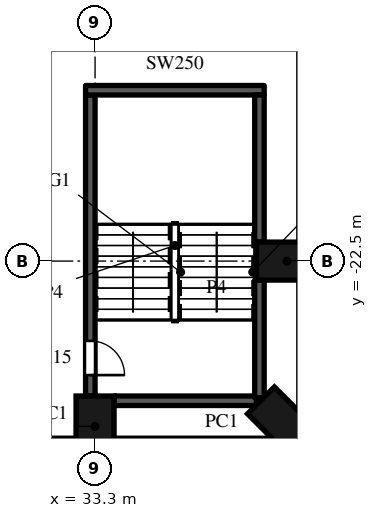
"""IFC4 building model, lengths in metres.
Left out: names, types, materials, properties, quantities, classifications, styles, units other than length and angle.
Written with IfcOpenShell. Run it as: python <this file> out.ifc"""

import sys

from ifc_helpers import new_model, si_unit, direction, frame, frame_2d, origin, origin_2d, place, context, subcontext, project, spatial, rectangle, extrude, element, fill, save


model = new_model("IFC4")
c1 = context("Model", 3, precision=1e-05, world=origin(), true_north=direction((0.0, 1.0)))
c2 = subcontext(c1, "Body", "Model", "MODEL_VIEW")
j1 = project(units=[si_unit("LENGTHUNIT", "METRE"), si_unit("PLANEANGLEUNIT", "RADIAN")], contexts=[c1])
p1 = place(None, origin())
s1 = spatial("IfcSite", under=j1, at=p1, CompositionType="ELEMENT")
p2 = place(p1, origin())
s2 = spatial("IfcBuilding", under=s1, at=p2, CompositionType="ELEMENT")
p3 = place(p2, frame((0.0, 0.0, 29.0)))
s3 = spatial("IfcBuildingStorey", under=s2, at=p3, CompositionType="ELEMENT", Elevation=29.0)
for number, where, z_axis, x_axis in (
    (1, (33.3, -26.85, 0.0), (0.0, 0.0, 1.0), (1.0, 0.0, 0.0)),
    (2, (38.231, -26.731, 0.0), (0.0, 0.0, 1.0), (0.707, 0.707, 0.0)),
    (3, (38.35, -22.5, 0.0), (0.0, 0.0, 1.0), (0.0, 1.0, 0.0)),
):
    element("IfcColumn", number, at=place(p3, frame(where, z_axis=z_axis, x_axis=x_axis)), inside=s3, PredefinedType="COLUMN", context=c2, shape_type="SweptSolid", body=[
        extrude(rectangle(XDim=1.0, YDim=1.6, at=origin_2d()), origin(), (0.0, 0.0, 1.0), 7.0),
    ])
p4 = place(p3, frame((24.8, -27.425, 0.0), z_axis=(0.0, 0.0, 1.0), x_axis=(1.0, 0.0, 0.0)))
e4 = element("IfcWall", 4, at=p4, inside=s3, PredefinedType="ELEMENTEDWALL", context=c2, shape_type="SweptSolid", body=[
    extrude(rectangle(XDim=8.0, YDim=0.6, at=frame_2d((4.0, 0.0))), origin(), (0.0, 0.0, 1.0), 6.6),
])
p5 = place(p3, frame((33.8, -27.425, 0.0), z_axis=(0.0, 0.0, 1.0), x_axis=(1.0, 0.0, 0.0)))
e5 = element("IfcWall", 5, at=p5, inside=s3, PredefinedType="ELEMENTEDWALL", context=c2, shape_type="SweptSolid", body=[
    extrude(rectangle(XDim=4.193, YDim=0.6, at=frame_2d((2.096, 0.0))), origin(), (0.0, 0.0, 1.0), 6.6),
])
p6 = place(p3, frame((33.175, -26.05, 0.0), z_axis=(0.0, 0.0, 1.0), x_axis=(0.0, 1.0, 0.0)))
e6 = element("IfcWall", 6, at=p6, inside=s3, PredefinedType="SHEAR", context=c2, shape_type="SweptSolid", body=[
    extrude(rectangle(XDim=7.92, YDim=0.25, at=frame_2d((3.96, 0.0))), origin(), (0.0, 0.0, 1.0), 6.6),
])
p7 = place(p6, frame((0.55, 0.0, 0.0)))
e7 = element("IfcOpeningElement", 7, at=p7, cuts=e6, PredefinedType="OPENING", context=c2, shape_type="SweptSolid", body=[
    extrude(rectangle(XDim=0.9, YDim=2.2, at=frame_2d((0.45, 1.1))), frame((0.0, 0.135, 0.0), z_axis=(0.0, -1.0, 0.0), x_axis=(1.0, 0.0, 0.0)), (0.0, 0.0, 1.0), 0.27),
])
p8 = place(p3, frame((33.8, -26.175, 0.0), z_axis=(0.0, 0.0, 1.0), x_axis=(1.0, 0.0, 0.0)))
e8 = element("IfcWall", 8, at=p8, inside=s3, PredefinedType="SHEAR", context=c2, shape_type="SweptSolid", body=[
    extrude(rectangle(XDim=3.745, YDim=0.25, at=frame_2d((1.873, 0.0))), origin(), (0.0, 0.0, 1.0), 6.6),
])
p9 = place(p3, frame((33.05, -18.005, 0.0), z_axis=(0.0, 0.0, 1.0), x_axis=(1.0, 0.0, 0.0)))
e9 = element("IfcWall", 9, at=p9, inside=s3, PredefinedType="SHEAR", context=c2, shape_type="SweptSolid", body=[
    extrude(rectangle(XDim=4.7, YDim=0.25, at=frame_2d((2.35, 0.0))), origin(), (0.0, 0.0, 1.0), 6.6),
])
p10 = place(p3, frame((37.625, -26.095, 0.0), z_axis=(0.0, 0.0, 1.0), x_axis=(0.0, 1.0, 0.0)))
e10 = element("IfcWall", 10, at=p10, inside=s3, PredefinedType="SHEAR", context=c2, shape_type="SweptSolid", body=[
    extrude(rectangle(XDim=3.095, YDim=0.25, at=frame_2d((1.548, 0.0))), origin(), (0.0, 0.0, 1.0), 6.6),
])
p11 = place(p3, frame((37.625, -22.0, 0.0), z_axis=(0.0, 0.0, 1.0), x_axis=(0.0, 1.0, 0.0)))
e11 = element("IfcWall", 11, at=p11, inside=s3, PredefinedType="SHEAR", context=c2, shape_type="SweptSolid", body=[
    extrude(rectangle(XDim=3.87, YDim=0.25, at=frame_2d((1.935, 0.0))), origin(), (0.0, 0.0, 1.0), 6.6),
])
p12 = place(p7, origin())
e12 = element("IfcDoor", 12, at=p12, inside=s3, OperationType="SINGLE_SWING_RIGHT", PredefinedType="DOOR", context=c2, shape_type="SweptSolid", body=[
    extrude(rectangle(XDim=0.9, YDim=2.2, at=frame_2d((0.45, 1.1))), frame((0.0, 0.025, 0.0), z_axis=(0.0, -1.0, 0.0), x_axis=(1.0, 0.0, 0.0)), (0.0, 0.0, 1.0), 0.05),
])
fill(e7, e12)
save(model, sys.argv[1])
